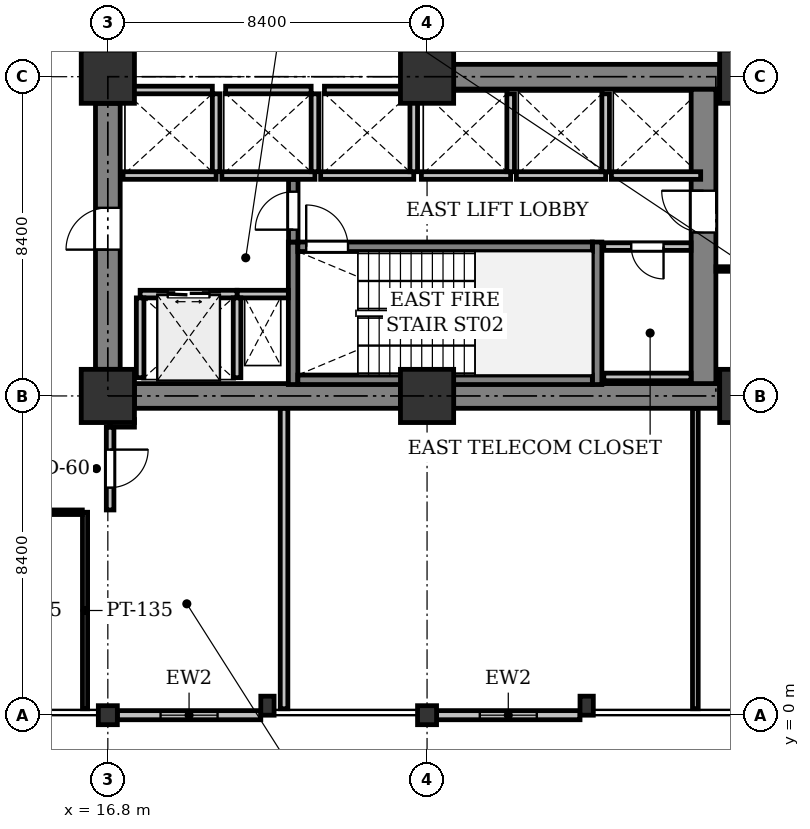
"""IFC4 building model, lengths in metres.
Left out: names, types, materials, properties, quantities, classifications, styles, units other than length and angle.
Written with IfcOpenShell. Run it as: python <this file> out.ifc"""

import sys

from ifc_helpers import new_model, si_unit, direction, frame, frame_2d, origin, origin_2d, place, context, subcontext, project, spatial, rectangle, i_section, extrude, element, fill, save


model = new_model("IFC4")
c1 = context("Model", 3, precision=1e-05, world=origin(), true_north=direction((0.0, 1.0)))
c2 = subcontext(c1, "Body", "Model", "MODEL_VIEW")
j1 = project(units=[si_unit("LENGTHUNIT", "METRE"), si_unit("PLANEANGLEUNIT", "RADIAN")], contexts=[c1])
p1 = place(None, origin())
s1 = spatial("IfcSite", under=j1, at=p1, CompositionType="ELEMENT")
p2 = place(p1, origin())
s2 = spatial("IfcBuilding", under=s1, at=p2, CompositionType="ELEMENT")
p3 = place(p2, frame((0.0, 0.0, 71.0)))
s3 = spatial("IfcBuildingStorey", under=s2, at=p3, CompositionType="ELEMENT", Elevation=71.0)
p4 = place(p3, frame((16.8, 0.0, 0.0), z_axis=(0.0, 0.0, 1.0), x_axis=(1.0, 0.0, 0.0)))
e1 = element("IfcColumn", 1, at=p4, inside=s3, PredefinedType="COLUMN", context=c2, shape_type="SweptSolid", body=[
    extrude(i_section(OverallWidth=0.5, OverallDepth=0.5, WebThickness=0.028, FlangeThickness=0.04, at=origin_2d()), origin(), (0.0, 0.0, 1.0), 4.2),
])
for number, where, z_axis, x_axis in (
    (2, (16.8, 8.4, 0.0), (0.0, 0.0, 1.0), (1.0, 0.0, 0.0)),
    (3, (16.8, 16.8, 0.0), (0.0, 0.0, 1.0), (1.0, 0.0, 0.0)),
):
    element("IfcColumn", number, at=place(p3, frame(where, z_axis=z_axis, x_axis=x_axis)), inside=s3, PredefinedType="COLUMN", context=c2, shape_type="SweptSolid", body=[
        extrude(rectangle(XDim=1.4, YDim=1.4, at=origin_2d()), origin(), (0.0, 0.0, 1.0), 4.2),
    ])
p5 = place(p3, frame((25.2, 0.0, 0.0), z_axis=(0.0, 0.0, 1.0), x_axis=(1.0, 0.0, 0.0)))
e4 = element("IfcColumn", 4, at=p5, inside=s3, PredefinedType="COLUMN", context=c2, shape_type="SweptSolid", body=[
    extrude(i_section(OverallWidth=0.5, OverallDepth=0.5, WebThickness=0.028, FlangeThickness=0.04, at=origin_2d()), origin(), (0.0, 0.0, 1.0), 4.2),
])
for number, where, z_axis, x_axis in (
    (5, (25.2, 8.4, 0.0), (0.0, 0.0, 1.0), (1.0, 0.0, 0.0)),
    (6, (25.2, 16.8, 0.0), (0.0, 0.0, 1.0), (1.0, 0.0, 0.0)),
    (7, (33.6, 8.4, 0.0), (0.0, 0.0, 1.0), (1.0, 0.0, 0.0)),
    (8, (33.6, 16.8, 0.0), (0.0, 0.0, 1.0), (1.0, 0.0, 0.0)),
):
    element("IfcColumn", number, at=place(p3, frame(where, z_axis=z_axis, x_axis=x_axis)), inside=s3, PredefinedType="COLUMN", context=c2, shape_type="SweptSolid", body=[
        extrude(rectangle(XDim=1.4, YDim=1.4, at=origin_2d()), origin(), (0.0, 0.0, 1.0), 4.2),
    ])
for number, where, z_axis, x_axis in (
    (9, (21.0, 0.25, 0.0), (0.0, 0.0, 1.0), (1.0, 0.0, 0.0)),
    (10, (29.4, 0.25, 0.0), (0.0, 0.0, 1.0), (1.0, 0.0, 0.0)),
):
    element("IfcColumn", number, at=place(p3, frame(where, z_axis=z_axis, x_axis=x_axis)), inside=s3, PredefinedType="PILASTER", context=c2, shape_type="SweptSolid", body=[
        extrude(rectangle(XDim=0.35, YDim=0.5, at=origin_2d()), origin(), (0.0, 0.0, 1.0), 4.2),
    ])
p6 = place(p3, frame((29.225, 0.0, 0.0), z_axis=(0.0, 0.0, 1.0), x_axis=(-1.0, 0.0, 0.0)))
e11 = element("IfcWall", 11, at=p6, inside=s3, PredefinedType="STANDARD", context=c2, shape_type="SweptSolid", body=[
    extrude(rectangle(XDim=3.775, YDim=0.24, at=frame_2d((1.888, 0.0))), origin(), (0.0, 0.0, 1.0), 3.471),
])
p7 = place(p6, frame((1.137, 0.0, 0.9)))
e12 = element("IfcOpeningElement", 12, at=p7, cuts=e11, PredefinedType="OPENING", context=c2, shape_type="SweptSolid", body=[
    extrude(rectangle(XDim=1.5, YDim=1.6, at=frame_2d((0.75, 0.8))), frame((0.0, 0.13, 0.0), z_axis=(0.0, -1.0, 0.0), x_axis=(1.0, 0.0, 0.0)), (0.0, 0.0, 1.0), 0.26),
])
p8 = place(p3, frame((20.825, 0.0, 0.0), z_axis=(0.0, 0.0, 1.0), x_axis=(-1.0, 0.0, 0.0)))
e13 = element("IfcWall", 13, at=p8, inside=s3, PredefinedType="STANDARD", context=c2, shape_type="SweptSolid", body=[
    extrude(rectangle(XDim=3.775, YDim=0.24, at=frame_2d((1.887, 0.0))), origin(), (0.0, 0.0, 1.0), 3.471),
])
p9 = place(p8, frame((1.137, 0.0, 0.9)))
e14 = element("IfcOpeningElement", 14, at=p9, cuts=e13, PredefinedType="OPENING", context=c2, shape_type="SweptSolid", body=[
    extrude(rectangle(XDim=1.5, YDim=1.6, at=frame_2d((0.75, 0.8))), frame((0.0, 0.13, 0.0), z_axis=(0.0, -1.0, 0.0), x_axis=(1.0, 0.0, 0.0)), (0.0, 0.0, 1.0), 0.26),
])
for number, where, z_axis, x_axis in (
    (15, (17.5, 8.4, 0.0), (0.0, 0.0, 1.0), (1.0, 0.0, 0.0)),
    (16, (25.9, 8.4, 0.0), (0.0, 0.0, 1.0), (1.0, 0.0, 0.0)),
):
    element("IfcWall", number, at=place(p3, frame(where, z_axis=z_axis, x_axis=x_axis)), inside=s3, PredefinedType="SHEAR", context=c2, shape_type="SweptSolid", body=[
        extrude(rectangle(XDim=7.0, YDim=0.65, at=frame_2d((3.5, 0.0))), origin(), (0.0, 0.0, 1.0), 3.925),
    ])
p10 = place(p3, frame((32.475, 8.725, 0.0), z_axis=(0.0, 0.0, 1.0), x_axis=(0.0, 1.0, 0.0)))
e17 = element("IfcWall", 17, at=p10, inside=s3, PredefinedType="SHEAR", context=c2, shape_type="SweptSolid", body=[
    extrude(rectangle(XDim=7.75, YDim=0.65, at=frame_2d((3.875, 0.0))), origin(), (0.0, 0.0, 1.0), 3.925),
])
p11 = place(p10, frame((3.975, 0.0, 0.0)))
e18 = element("IfcOpeningElement", 18, at=p11, cuts=e17, PredefinedType="OPENING", context=c2, shape_type="SweptSolid", body=[
    extrude(rectangle(XDim=1.1, YDim=2.15, at=frame_2d((0.55, 1.075))), frame((0.0, 0.335, 0.0), z_axis=(0.0, -1.0, 0.0), x_axis=(1.0, 0.0, 0.0)), (0.0, 0.0, 1.0), 0.67),
])
p12 = place(p3, frame((16.8, 9.1, 0.0), z_axis=(0.0, 0.0, 1.0), x_axis=(0.0, 1.0, 0.0)))
e19 = element("IfcWall", 19, at=p12, inside=s3, PredefinedType="SHEAR", context=c2, shape_type="SweptSolid", body=[
    extrude(rectangle(XDim=7.0, YDim=0.65, at=frame_2d((3.5, 0.0))), origin(), (0.0, 0.0, 1.0), 3.925),
])
p13 = place(p12, frame((3.15, 0.0, 0.0)))
e20 = element("IfcOpeningElement", 20, at=p13, cuts=e19, PredefinedType="OPENING", context=c2, shape_type="SweptSolid", body=[
    extrude(rectangle(XDim=1.1, YDim=2.15, at=frame_2d((0.55, 1.075))), frame((0.0, 0.335, 0.0), z_axis=(0.0, -1.0, 0.0), x_axis=(1.0, 0.0, 0.0)), (0.0, 0.0, 1.0), 0.67),
])
p14 = place(p3, frame((25.9, 16.8, 0.0), z_axis=(0.0, 0.0, 1.0), x_axis=(1.0, 0.0, 0.0)))
e21 = element("IfcWall", 21, at=p14, inside=s3, PredefinedType="SHEAR", context=c2, shape_type="SweptSolid", body=[
    extrude(rectangle(XDim=7.0, YDim=0.65, at=frame_2d((3.5, 0.0))), origin(), (0.0, 0.0, 1.0), 3.925),
])
for number, where, z_axis, x_axis in (
    (22, (21.675, 8.7, 0.0), (0.0, 0.0, 1.0), (0.0, 1.0, 0.0)),
    (23, (29.675, 8.7, 0.0), (0.0, 0.0, 1.0), (0.0, 1.0, 0.0)),
):
    element("IfcWall", number, at=place(p3, frame(where, z_axis=z_axis, x_axis=x_axis)), inside=s3, PredefinedType="SHEAR", context=c2, shape_type="SweptSolid", body=[
        extrude(rectangle(XDim=3.75, YDim=0.25, at=frame_2d((1.875, 0.0))), origin(), (0.0, 0.0, 1.0), 3.925),
    ])
p15 = place(p3, frame((21.8, 8.825, 0.0), z_axis=(0.0, 0.0, 1.0), x_axis=(1.0, 0.0, 0.0)))
e24 = element("IfcWall", 24, at=p15, inside=s3, PredefinedType="SHEAR", context=c2, shape_type="SweptSolid", body=[
    extrude(rectangle(XDim=7.75, YDim=0.25, at=frame_2d((3.875, 0.0))), origin(), (0.0, 0.0, 1.0), 3.925),
])
p16 = place(p3, frame((21.8, 12.325, 0.0), z_axis=(0.0, 0.0, 1.0), x_axis=(1.0, 0.0, 0.0)))
e25 = element("IfcWall", 25, at=p16, inside=s3, PredefinedType="SHEAR", context=c2, shape_type="SweptSolid", body=[
    extrude(rectangle(XDim=7.75, YDim=0.25, at=frame_2d((3.875, 0.0))), origin(), (0.0, 0.0, 1.0), 3.925),
])
p17 = place(p16, frame((0.22, 0.0, 0.0)))
e26 = element("IfcOpeningElement", 26, at=p17, cuts=e25, PredefinedType="OPENING", context=c2, shape_type="SweptSolid", body=[
    extrude(rectangle(XDim=1.1, YDim=2.15, at=frame_2d((0.55, 1.075))), frame((0.0, 0.135, 0.0), z_axis=(0.0, -1.0, 0.0), x_axis=(1.0, 0.0, 0.0)), (0.0, 0.0, 1.0), 0.27),
])
p18 = place(p3, frame((20.2, 11.08, 0.0), z_axis=(0.0, 0.0, 1.0), x_axis=(1.0, 0.0, 0.0)))
e27 = element("IfcWall", 27, at=p18, inside=s3, PredefinedType="PARTITIONING", context=c2, shape_type="SweptSolid", body=[
    extrude(rectangle(XDim=1.35, YDim=0.2, at=frame_2d((0.675, 0.0))), origin(), (0.0, 0.0, 1.0), 3.925),
])
p19 = place(p3, frame((21.68, 12.45, 0.0), z_axis=(0.0, 0.0, 1.0), x_axis=(0.0, 1.0, 0.0)))
e28 = element("IfcWall", 28, at=p19, inside=s3, PredefinedType="SHEAR", context=c2, shape_type="SweptSolid", body=[
    extrude(rectangle(XDim=1.65, YDim=0.25, at=frame_2d((0.825, 0.0))), origin(), (0.0, 0.0, 1.0), 3.925),
])
p20 = place(p19, frame((0.325, 0.0, 0.0)))
e29 = element("IfcOpeningElement", 29, at=p20, cuts=e28, PredefinedType="OPENING", context=c2, shape_type="SweptSolid", body=[
    extrude(rectangle(XDim=1.0, YDim=2.15, at=frame_2d((0.5, 1.075))), frame((0.0, 0.135, 0.0), z_axis=(0.0, -1.0, 0.0), x_axis=(1.0, 0.0, 0.0)), (0.0, 0.0, 1.0), 0.27),
])
p21 = place(p3, frame((17.65, 11.08, 0.0), z_axis=(0.0, 0.0, 1.0), x_axis=(1.0, 0.0, 0.0)))
e30 = element("IfcWall", 30, at=p21, inside=s3, PredefinedType="PARTITIONING", context=c2, shape_type="SweptSolid", body=[
    extrude(rectangle(XDim=2.55, YDim=0.2, at=frame_2d((1.275, 0.0))), origin(), (0.0, 0.0, 1.0), 3.925),
])
p22 = place(p21, frame((0.725, 0.0, 0.0)))
e31 = element("IfcOpeningElement", 31, at=p22, cuts=e30, PredefinedType="OPENING", context=c2, shape_type="SweptSolid", body=[
    extrude(rectangle(XDim=1.1, YDim=2.2, at=frame_2d((0.55, 1.1))), frame((0.0, 0.11, 0.0), z_axis=(0.0, -1.0, 0.0), x_axis=(1.0, 0.0, 0.0)), (0.0, 0.0, 1.0), 0.22),
])
for number, where, z_axis, x_axis in (
    (32, (20.2, 8.88, 0.0), (0.0, 0.0, 1.0), (0.0, 1.0, 0.0)),
    (33, (17.65, 8.88, 0.0), (0.0, 0.0, 1.0), (0.0, 1.0, 0.0)),
):
    element("IfcWall", number, at=place(p3, frame(where, z_axis=z_axis, x_axis=x_axis)), inside=s3, PredefinedType="PARTITIONING", context=c2, shape_type="SweptSolid", body=[
        extrude(rectangle(XDim=2.1, YDim=0.2, at=frame_2d((1.05, 0.0))), origin(), (0.0, 0.0, 1.0), 3.925),
    ])
p23 = place(p3, frame((17.2, 14.2, 0.0), z_axis=(0.0, 0.0, 1.0), x_axis=(1.0, 0.0, 0.0)))
e34 = element("IfcWall", 34, at=p23, inside=s3, PredefinedType="PARTITIONING", context=c2, shape_type="SweptSolid", body=[
    extrude(rectangle(XDim=2.45, YDim=0.2, at=frame_2d((1.225, 0.0))), origin(), (0.0, 0.0, 1.0), 3.925),
])
p24 = place(p3, frame((19.65, 14.3, 0.0), z_axis=(0.0, 0.0, 1.0), x_axis=(0.0, 1.0, 0.0)))
e35 = element("IfcWall", 35, at=p24, inside=s3, PredefinedType="PARTITIONING", context=c2, shape_type="SweptSolid", body=[
    extrude(rectangle(XDim=2.05, YDim=0.2, at=frame_2d((1.025, 0.0))), origin(), (0.0, 0.0, 1.0), 3.925),
])
p25 = place(p3, frame((17.3, 16.45, 0.0), z_axis=(0.0, 0.0, 1.0), x_axis=(1.0, 0.0, 0.0)))
e36 = element("IfcWall", 36, at=p25, inside=s3, PredefinedType="PARTITIONING", context=c2, shape_type="SweptSolid", body=[
    extrude(rectangle(XDim=2.25, YDim=0.2, at=frame_2d((1.125, 0.0))), origin(), (0.0, 0.0, 1.0), 3.925),
])
p26 = place(p3, frame((19.8, 14.2, 0.0), z_axis=(0.0, 0.0, 1.0), x_axis=(1.0, 0.0, 0.0)))
e37 = element("IfcWall", 37, at=p26, inside=s3, PredefinedType="PARTITIONING", context=c2, shape_type="SweptSolid", body=[
    extrude(rectangle(XDim=2.45, YDim=0.2, at=frame_2d((1.225, 0.0))), origin(), (0.0, 0.0, 1.0), 3.925),
])
p27 = place(p3, frame((22.25, 14.3, 0.0), z_axis=(0.0, 0.0, 1.0), x_axis=(0.0, 1.0, 0.0)))
e38 = element("IfcWall", 38, at=p27, inside=s3, PredefinedType="PARTITIONING", context=c2, shape_type="SweptSolid", body=[
    extrude(rectangle(XDim=2.05, YDim=0.2, at=frame_2d((1.025, 0.0))), origin(), (0.0, 0.0, 1.0), 3.925),
])
p28 = place(p3, frame((19.9, 16.45, 0.0), z_axis=(0.0, 0.0, 1.0), x_axis=(1.0, 0.0, 0.0)))
e39 = element("IfcWall", 39, at=p28, inside=s3, PredefinedType="PARTITIONING", context=c2, shape_type="SweptSolid", body=[
    extrude(rectangle(XDim=2.25, YDim=0.2, at=frame_2d((1.125, 0.0))), origin(), (0.0, 0.0, 1.0), 3.925),
])
p29 = place(p3, frame((22.4, 14.2, 0.0), z_axis=(0.0, 0.0, 1.0), x_axis=(1.0, 0.0, 0.0)))
e40 = element("IfcWall", 40, at=p29, inside=s3, PredefinedType="PARTITIONING", context=c2, shape_type="SweptSolid", body=[
    extrude(rectangle(XDim=2.45, YDim=0.2, at=frame_2d((1.225, 0.0))), origin(), (0.0, 0.0, 1.0), 3.925),
])
p30 = place(p3, frame((24.85, 14.3, 0.0), z_axis=(0.0, 0.0, 1.0), x_axis=(0.0, 1.0, 0.0)))
e41 = element("IfcWall", 41, at=p30, inside=s3, PredefinedType="PARTITIONING", context=c2, shape_type="SweptSolid", body=[
    extrude(rectangle(XDim=2.05, YDim=0.2, at=frame_2d((1.025, 0.0))), origin(), (0.0, 0.0, 1.0), 3.925),
])
p31 = place(p3, frame((22.5, 16.45, 0.0), z_axis=(0.0, 0.0, 1.0), x_axis=(1.0, 0.0, 0.0)))
e42 = element("IfcWall", 42, at=p31, inside=s3, PredefinedType="PARTITIONING", context=c2, shape_type="SweptSolid", body=[
    extrude(rectangle(XDim=2.25, YDim=0.2, at=frame_2d((1.125, 0.0))), origin(), (0.0, 0.0, 1.0), 3.925),
])
p32 = place(p3, frame((25.05, 14.2, 0.0), z_axis=(0.0, 0.0, 1.0), x_axis=(1.0, 0.0, 0.0)))
e43 = element("IfcWall", 43, at=p32, inside=s3, PredefinedType="PARTITIONING", context=c2, shape_type="SweptSolid", body=[
    extrude(rectangle(XDim=2.35, YDim=0.2, at=frame_2d((1.175, 0.0))), origin(), (0.0, 0.0, 1.0), 3.925),
])
p33 = place(p3, frame((27.4, 14.3, 0.0), z_axis=(0.0, 0.0, 1.0), x_axis=(0.0, 1.0, 0.0)))
e44 = element("IfcWall", 44, at=p33, inside=s3, PredefinedType="PARTITIONING", context=c2, shape_type="SweptSolid", body=[
    extrude(rectangle(XDim=2.05, YDim=0.2, at=frame_2d((1.025, 0.0))), origin(), (0.0, 0.0, 1.0), 3.925),
])
p34 = place(p3, frame((27.55, 14.2, 0.0), z_axis=(0.0, 0.0, 1.0), x_axis=(1.0, 0.0, 0.0)))
e45 = element("IfcWall", 45, at=p34, inside=s3, PredefinedType="PARTITIONING", context=c2, shape_type="SweptSolid", body=[
    extrude(rectangle(XDim=2.35, YDim=0.2, at=frame_2d((1.175, 0.0))), origin(), (0.0, 0.0, 1.0), 3.925),
])
p35 = place(p3, frame((29.9, 14.3, 0.0), z_axis=(0.0, 0.0, 1.0), x_axis=(0.0, 1.0, 0.0)))
e46 = element("IfcWall", 46, at=p35, inside=s3, PredefinedType="PARTITIONING", context=c2, shape_type="SweptSolid", body=[
    extrude(rectangle(XDim=2.05, YDim=0.2, at=frame_2d((1.025, 0.0))), origin(), (0.0, 0.0, 1.0), 3.925),
])
p36 = place(p3, frame((30.05, 14.2, 0.0), z_axis=(0.0, 0.0, 1.0), x_axis=(1.0, 0.0, 0.0)))
e47 = element("IfcWall", 47, at=p36, inside=s3, PredefinedType="PARTITIONING", context=c2, shape_type="SweptSolid", body=[
    extrude(rectangle(XDim=2.35, YDim=0.2, at=frame_2d((1.175, 0.0))), origin(), (0.0, 0.0, 1.0), 3.925),
])
p37 = place(p3, frame((32.146, 12.33, 0.0), z_axis=(0.0, 0.0, 1.0), x_axis=(-1.0, 0.0, 0.0)))
e48 = element("IfcWall", 48, at=p37, inside=s3, PredefinedType="PARTITIONING", context=c2, shape_type="SweptSolid", body=[
    extrude(rectangle(XDim=2.296, YDim=0.2, at=frame_2d((1.148, 0.0))), origin(), (0.0, 0.0, 1.0), 3.925),
])
p38 = place(p37, frame((0.723, 0.0, 0.0)))
e49 = element("IfcOpeningElement", 49, at=p38, cuts=e48, PredefinedType="OPENING", context=c2, shape_type="SweptSolid", body=[
    extrude(rectangle(XDim=0.85, YDim=2.15, at=frame_2d((0.425, 1.075))), frame((0.0, 0.11, 0.0), z_axis=(0.0, -1.0, 0.0), x_axis=(1.0, 0.0, 0.0)), (0.0, 0.0, 1.0), 0.22),
])
p39 = place(p3, frame((29.85, 8.9, 0.0), z_axis=(0.0, 0.0, 1.0), x_axis=(1.0, 0.0, 0.0)))
e50 = element("IfcWall", 50, at=p39, inside=s3, PredefinedType="PARTITIONING", context=c2, shape_type="SweptSolid", body=[
    extrude(rectangle(XDim=2.296, YDim=0.2, at=frame_2d((1.148, 0.0))), origin(), (0.0, 0.0, 1.0), 3.925),
])
p40 = place(p3, frame((16.2, 0.169, 0.0), z_axis=(0.0, 0.0, 1.0), x_axis=(0.0, 1.0, 0.0)))
e51 = element("IfcWall", 51, at=p40, inside=s3, PredefinedType="PARTITIONING", context=c2, shape_type="SweptSolid", body=[
    extrude(rectangle(XDim=5.171, YDim=0.135, at=frame_2d((2.585, 0.0))), origin(), (0.0, 0.0, 1.0), 3.925),
])
p41 = place(p3, frame((16.128, 5.34, 0.0), z_axis=(0.0, 0.0, 1.0), x_axis=(-1.0, 0.0, 0.0)))
e52 = element("IfcWall", 52, at=p41, inside=s3, PredefinedType="PARTITIONING", context=c2, shape_type="SweptSolid", body=[
    extrude(rectangle(XDim=2.857, YDim=0.12, at=frame_2d((1.428, 0.0))), origin(), (0.0, 0.0, 1.0), 3.925),
])
p42 = place(p41, frame((0.969, 0.0, 0.0)))
e53 = element("IfcOpeningElement", 53, at=p42, cuts=e52, PredefinedType="OPENING", context=c2, shape_type="SweptSolid", body=[
    extrude(rectangle(XDim=0.92, YDim=2.1, at=frame_2d((0.46, 1.05))), frame((0.0, 0.07, 0.0), z_axis=(0.0, -1.0, 0.0), x_axis=(1.0, 0.0, 0.0)), (0.0, 0.0, 1.0), 0.14),
])
p43 = place(p3, frame((21.437, 0.169, 0.0), z_axis=(0.0, 0.0, 1.0), x_axis=(0.0, 1.0, 0.0)))
e54 = element("IfcWall", 54, at=p43, inside=s3, PredefinedType="PARTITIONING", context=c2, shape_type="SweptSolid", body=[
    extrude(rectangle(XDim=7.902, YDim=0.2, at=frame_2d((3.951, 0.0))), origin(), (0.0, 0.0, 1.0), 3.925),
])
p44 = place(p3, frame((17.5, 7.68, 0.0), z_axis=(0.0, 0.0, 1.0), x_axis=(-1.0, 0.0, 0.0)))
e55 = element("IfcWall", 55, at=p44, inside=s3, PredefinedType="PARTITIONING", context=c2, shape_type="SweptSolid", body=[
    extrude(rectangle(XDim=0.64, YDim=0.2, at=frame_2d((0.32, 0.0))), origin(), (0.0, 0.0, 1.0), 3.323),
])
p45 = place(p3, frame((16.86, 7.576, 0.0), z_axis=(0.0, 0.0, 1.0), x_axis=(0.0, -1.0, 0.0)))
e56 = element("IfcWall", 56, at=p45, inside=s3, PredefinedType="PARTITIONING", context=c2, shape_type="SweptSolid", body=[
    extrude(rectangle(XDim=2.176, YDim=0.2, at=frame_2d((1.088, 0.0))), origin(), (0.0, 0.0, 1.0), 3.323),
])
p46 = place(p45, frame((0.588, 0.0, 0.0)))
e57 = element("IfcOpeningElement", 57, at=p46, cuts=e56, PredefinedType="OPENING", context=c2, shape_type="SweptSolid", body=[
    extrude(rectangle(XDim=1.0, YDim=2.15, at=frame_2d((0.5, 1.075))), frame((0.0, 0.11, 0.0), z_axis=(0.0, -1.0, 0.0), x_axis=(1.0, 0.0, 0.0)), (0.0, 0.0, 1.0), 0.22),
])
p47 = place(p3, frame((34.261, 11.74, 0.0), z_axis=(0.0, 0.0, 1.0), x_axis=(-1.0, 0.0, 0.0)))
e58 = element("IfcWall", 58, at=p47, inside=s3, PredefinedType="PARTITIONING", context=c2, shape_type="SweptSolid", body=[
    extrude(rectangle(XDim=1.457, YDim=0.12, at=frame_2d((0.729, 0.0))), origin(), (0.0, 0.0, 1.0), 3.323),
])
p48 = place(p3, frame((32.26, 8.071, 0.0), z_axis=(0.0, 0.0, 1.0), x_axis=(0.0, -1.0, 0.0)))
e59 = element("IfcWall", 59, at=p48, inside=s3, PredefinedType="PARTITIONING", context=c2, shape_type="SweptSolid", body=[
    extrude(rectangle(XDim=7.902, YDim=0.15, at=frame_2d((3.951, 0.0))), origin(), (0.0, 0.0, 1.0), 3.925),
])
p49 = place(p7, origin())
e60 = element("IfcWindow", 60, at=p49, inside=s3, PartitioningType="SINGLE_PANEL", PredefinedType="WINDOW", context=c2, shape_type="SweptSolid", body=[
    extrude(rectangle(XDim=1.5, YDim=1.6, at=frame_2d((0.75, 0.8))), frame((0.0, 0.03, 0.0), z_axis=(0.0, -1.0, 0.0), x_axis=(1.0, 0.0, 0.0)), (0.0, 0.0, 1.0), 0.06),
])
fill(e12, e60)
p50 = place(p9, origin())
e61 = element("IfcWindow", 61, at=p50, inside=s3, PartitioningType="SINGLE_PANEL", PredefinedType="WINDOW", context=c2, shape_type="SweptSolid", body=[
    extrude(rectangle(XDim=1.5, YDim=1.6, at=frame_2d((0.75, 0.8))), frame((0.0, 0.03, 0.0), z_axis=(0.0, -1.0, 0.0), x_axis=(1.0, 0.0, 0.0)), (0.0, 0.0, 1.0), 0.06),
])
fill(e14, e61)
p51 = place(p11, origin())
e62 = element("IfcDoor", 62, at=p51, inside=s3, OperationType="SINGLE_SWING_RIGHT", PredefinedType="DOOR", context=c2, shape_type="SweptSolid", body=[
    extrude(rectangle(XDim=1.1, YDim=2.15, at=frame_2d((0.55, 1.075))), frame((0.0, 0.025, 0.0), z_axis=(0.0, -1.0, 0.0), x_axis=(1.0, 0.0, 0.0)), (0.0, 0.0, 1.0), 0.05),
])
fill(e18, e62)
p52 = place(p13, origin())
e63 = element("IfcDoor", 63, at=p52, inside=s3, OperationType="SINGLE_SWING_LEFT", PredefinedType="DOOR", context=c2, shape_type="SweptSolid", body=[
    extrude(rectangle(XDim=1.1, YDim=2.15, at=frame_2d((0.55, 1.075))), frame((0.0, 0.025, 0.0), z_axis=(0.0, -1.0, 0.0), x_axis=(1.0, 0.0, 0.0)), (0.0, 0.0, 1.0), 0.05),
])
fill(e20, e63)
p53 = place(p17, origin())
e64 = element("IfcDoor", 64, at=p53, inside=s3, OperationType="SINGLE_SWING_LEFT", PredefinedType="DOOR", context=c2, shape_type="SweptSolid", body=[
    extrude(rectangle(XDim=1.1, YDim=2.15, at=frame_2d((0.55, 1.075))), frame((0.0, 0.025, 0.0), z_axis=(0.0, -1.0, 0.0), x_axis=(1.0, 0.0, 0.0)), (0.0, 0.0, 1.0), 0.05),
])
fill(e26, e64)
p54 = place(p20, origin())
e65 = element("IfcDoor", 65, at=p54, inside=s3, OperationType="SINGLE_SWING_LEFT", PredefinedType="DOOR", context=c2, shape_type="SweptSolid", body=[
    extrude(rectangle(XDim=1.0, YDim=2.15, at=frame_2d((0.5, 1.075))), frame((0.0, 0.025, 0.0), z_axis=(0.0, -1.0, 0.0), x_axis=(1.0, 0.0, 0.0)), (0.0, 0.0, 1.0), 0.05),
])
fill(e29, e65)
p55 = place(p22, origin())
e66 = element("IfcDoor", 66, at=p55, inside=s3, OperationType="DOUBLE_DOOR_SLIDING", PredefinedType="DOOR", context=c2, shape_type="SweptSolid", body=[
    extrude(rectangle(XDim=1.1, YDim=2.2, at=frame_2d((0.55, 1.1))), frame((0.0, 0.025, 0.0), z_axis=(0.0, -1.0, 0.0), x_axis=(1.0, 0.0, 0.0)), (0.0, 0.0, 1.0), 0.05),
])
fill(e31, e66)
p56 = place(p38, origin())
e67 = element("IfcDoor", 67, at=p56, inside=s3, OperationType="SINGLE_SWING_LEFT", PredefinedType="DOOR", context=c2, shape_type="SweptSolid", body=[
    extrude(rectangle(XDim=0.85, YDim=2.15, at=frame_2d((0.425, 1.075))), frame((0.0, 0.025, 0.0), z_axis=(0.0, -1.0, 0.0), x_axis=(1.0, 0.0, 0.0)), (0.0, 0.0, 1.0), 0.05),
])
fill(e49, e67)
p57 = place(p46, origin())
e68 = element("IfcDoor", 68, at=p57, inside=s3, OperationType="SINGLE_SWING_LEFT", PredefinedType="DOOR", context=c2, shape_type="SweptSolid", body=[
    extrude(rectangle(XDim=1.0, YDim=2.15, at=frame_2d((0.5, 1.075))), frame((0.0, 0.025, 0.0), z_axis=(0.0, -1.0, 0.0), x_axis=(1.0, 0.0, 0.0)), (0.0, 0.0, 1.0), 0.05),
])
fill(e57, e68)
save(model, sys.argv[1])
